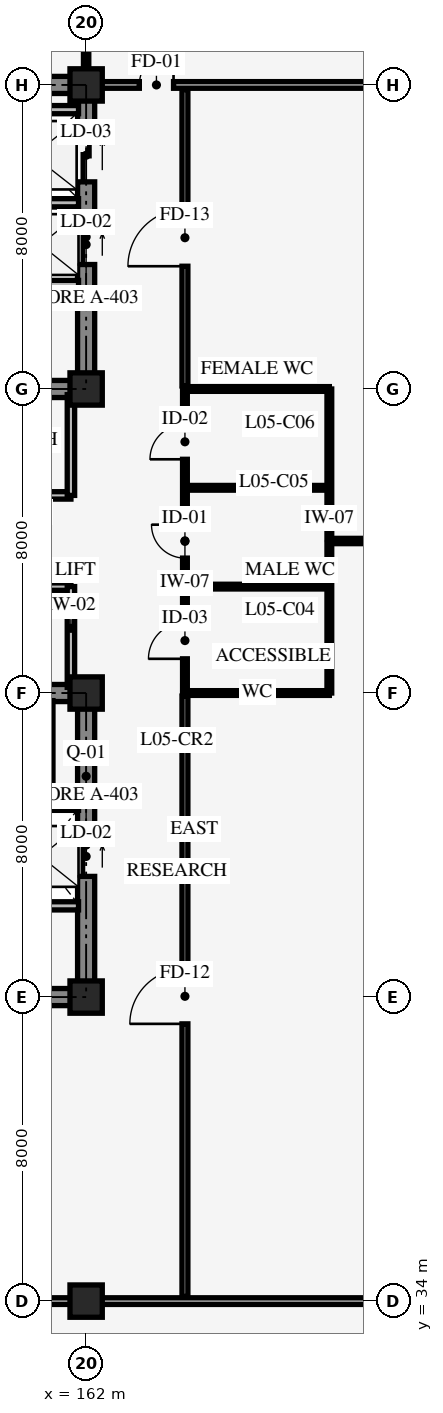
"""IFC4 building model, lengths in metres.
Left out: names, types, materials, properties, quantities, classifications, styles, units other than length and angle.
Written with IfcOpenShell. Run it as: python <this file> out.ifc"""

import sys

from ifc_helpers import new_model, si_unit, direction, frame, frame_2d, origin, origin_2d, place, context, subcontext, project, spatial, rectangle, extrude, element, fill, save


model = new_model("IFC4")
c1 = context("Model", 3, precision=1e-05, world=origin(), true_north=direction((0.0, 1.0)))
c2 = subcontext(c1, "Body", "Model", "MODEL_VIEW")
j1 = project(units=[si_unit("LENGTHUNIT", "METRE"), si_unit("PLANEANGLEUNIT", "RADIAN")], contexts=[c1])
p1 = place(None, origin())
s1 = spatial("IfcSite", under=j1, at=p1, CompositionType="ELEMENT")
p2 = place(p1, origin())
s2 = spatial("IfcBuilding", under=s1, at=p2, CompositionType="ELEMENT")
p3 = place(p2, frame((0.0, 0.0, 19.2)))
s3 = spatial("IfcBuildingStorey", under=s2, at=p3, CompositionType="ELEMENT", Elevation=19.2)
p4 = place(p3, frame((154.0, 42.0, 0.0), z_axis=(0.0, 0.0, 1.0), x_axis=(1.0, 0.0, 0.0)))
e1 = element("IfcWall", 1, at=p4, inside=s3, PredefinedType="SHEAR", context=c2, shape_type="SweptSolid", body=[
    extrude(rectangle(XDim=8.0, YDim=0.45, at=frame_2d((4.0, 0.0))), origin(), (0.0, 0.0, 1.0), 3.95),
])
p5 = place(p3, frame((162.0, 42.0, 0.0), z_axis=(0.0, 0.0, 1.0), x_axis=(0.0, 1.0, 0.0)))
e2 = element("IfcWall", 2, at=p5, inside=s3, PredefinedType="SHEAR", context=c2, shape_type="SweptSolid", body=[
    extrude(rectangle(XDim=8.0, YDim=0.45, at=frame_2d((4.0, 0.0))), origin(), (0.0, 0.0, 1.0), 3.95),
])
p6 = place(p5, frame((3.175, 0.0, 0.0)))
e3 = element("IfcOpeningElement", 3, at=p6, cuts=e2, PredefinedType="OPENING", context=c2, shape_type="SweptSolid", body=[
    extrude(rectangle(XDim=1.05, YDim=2.2, at=frame_2d((0.525, 1.1))), frame((0.0, 0.235, 0.0), z_axis=(0.0, -1.0, 0.0), x_axis=(1.0, 0.0, 0.0)), (0.0, 0.0, 1.0), 0.47),
])
p7 = place(p3, frame((162.0, 50.0, 0.0), z_axis=(0.0, 0.0, 1.0), x_axis=(-1.0, 0.0, 0.0)))
e4 = element("IfcWall", 4, at=p7, inside=s3, PredefinedType="SHEAR", context=c2, shape_type="SweptSolid", body=[
    extrude(rectangle(XDim=8.0, YDim=0.45, at=frame_2d((4.0, 0.0))), origin(), (0.0, 0.0, 1.0), 3.95),
])
p8 = place(p7, frame((5.3, 0.0, 0.0)))
e5 = element("IfcOpeningElement", 5, at=p8, cuts=e4, PredefinedType="OPENING", context=c2, shape_type="SweptSolid", body=[
    extrude(rectangle(XDim=1.3, YDim=2.15, at=frame_2d((0.65, 1.075))), frame((0.0, 0.235, 0.0), z_axis=(0.0, -1.0, 0.0), x_axis=(1.0, 0.0, 0.0)), (0.0, 0.0, 1.0), 0.47),
])
p9 = place(p7, frame((1.45, 0.0, 0.0)))
e6 = element("IfcOpeningElement", 6, at=p9, cuts=e4, PredefinedType="OPENING", context=c2, shape_type="SweptSolid", body=[
    extrude(rectangle(XDim=1.1, YDim=2.2, at=frame_2d((0.55, 1.1))), frame((0.0, 0.235, 0.0), z_axis=(0.0, -1.0, 0.0), x_axis=(1.0, 0.0, 0.0)), (0.0, 0.0, 1.0), 0.47),
])
p10 = place(p3, frame((154.0, 58.0, 0.0), z_axis=(0.0, 0.0, 1.0), x_axis=(1.0, 0.0, 0.0)))
e7 = element("IfcWall", 7, at=p10, inside=s3, PredefinedType="SHEAR", context=c2, shape_type="SweptSolid", body=[
    extrude(rectangle(XDim=8.0, YDim=0.45, at=frame_2d((4.0, 0.0))), origin(), (0.0, 0.0, 1.0), 3.95),
])
p11 = place(p10, frame((1.4, 0.0, 0.0)))
e8 = element("IfcOpeningElement", 8, at=p11, cuts=e7, PredefinedType="OPENING", context=c2, shape_type="SweptSolid", body=[
    extrude(rectangle(XDim=1.3, YDim=2.15, at=frame_2d((0.65, 1.075))), frame((0.0, 0.235, 0.0), z_axis=(0.0, -1.0, 0.0), x_axis=(1.0, 0.0, 0.0)), (0.0, 0.0, 1.0), 0.47),
])
p12 = place(p10, frame((5.3, 0.0, 0.0)))
e9 = element("IfcOpeningElement", 9, at=p12, cuts=e7, PredefinedType="OPENING", context=c2, shape_type="SweptSolid", body=[
    extrude(rectangle(XDim=1.1, YDim=2.2, at=frame_2d((0.55, 1.1))), frame((0.0, 0.235, 0.0), z_axis=(0.0, -1.0, 0.0), x_axis=(1.0, 0.0, 0.0)), (0.0, 0.0, 1.0), 0.47),
])
p13 = place(p3, frame((162.0, 58.0, 0.0), z_axis=(0.0, 0.0, 1.0), x_axis=(0.0, 1.0, 0.0)))
e10 = element("IfcWall", 10, at=p13, inside=s3, PredefinedType="SHEAR", context=c2, shape_type="SweptSolid", body=[
    extrude(rectangle(XDim=8.0, YDim=0.45, at=frame_2d((4.0, 0.0))), origin(), (0.0, 0.0, 1.0), 3.95),
])
p14 = place(p13, frame((3.275, 0.0, 0.0)))
e11 = element("IfcOpeningElement", 11, at=p14, cuts=e10, PredefinedType="OPENING", context=c2, shape_type="SweptSolid", body=[
    extrude(rectangle(XDim=1.05, YDim=2.2, at=frame_2d((0.525, 1.1))), frame((0.0, 0.235, 0.0), z_axis=(0.0, -1.0, 0.0), x_axis=(1.0, 0.0, 0.0)), (0.0, 0.0, 1.0), 0.47),
])
p15 = place(p13, frame((5.45, 0.0, 0.0)))
e12 = element("IfcOpeningElement", 12, at=p15, cuts=e10, PredefinedType="OPENING", context=c2, shape_type="SweptSolid", body=[
    extrude(rectangle(XDim=1.4, YDim=2.3, at=frame_2d((0.7, 1.15))), frame((0.0, 0.235, 0.0), z_axis=(0.0, -1.0, 0.0), x_axis=(1.0, 0.0, 0.0)), (0.0, 0.0, 1.0), 0.47),
])
p16 = place(p3, frame((162.0, 66.0, 0.0), z_axis=(0.0, 0.0, 1.0), x_axis=(-1.0, 0.0, 0.0)))
e13 = element("IfcWall", 13, at=p16, inside=s3, PredefinedType="SHEAR", context=c2, shape_type="SweptSolid", body=[
    extrude(rectangle(XDim=8.0, YDim=0.45, at=frame_2d((4.0, 0.0))), origin(), (0.0, 0.0, 1.0), 3.95),
])
for number, where, z_axis, x_axis in (
    (14, (162.0, 34.0, 0.0), (0.0, 0.0, 1.0), (1.0, 0.0, 0.0)),
    (15, (162.0, 42.0, 0.0), (0.0, 0.0, 1.0), (1.0, 0.0, 0.0)),
    (16, (162.0, 50.0, 0.0), (0.0, 0.0, 1.0), (1.0, 0.0, 0.0)),
    (17, (162.0, 58.0, 0.0), (0.0, 0.0, 1.0), (1.0, 0.0, 0.0)),
    (18, (162.0, 66.0, 0.0), (0.0, 0.0, 1.0), (1.0, 0.0, 0.0)),
):
    element("IfcColumn", number, at=place(p3, frame(where, z_axis=z_axis, x_axis=x_axis)), inside=s3, PredefinedType="COLUMN", context=c2, shape_type="SweptSolid", body=[
        extrude(rectangle(XDim=0.85, YDim=0.85, at=origin_2d()), origin(), (0.0, 0.0, 1.0), 4.2),
    ])
p17 = place(p3, frame((158.45, 47.02, 0.0), z_axis=(0.0, 0.0, 1.0), x_axis=(1.0, 0.0, 0.0)))
e19 = element("IfcWall", 19, at=p17, inside=s3, PredefinedType="STANDARD", context=c2, shape_type="SweptSolid", body=[
    extrude(rectangle(XDim=3.35, YDim=0.215, at=frame_2d((1.675, 0.0))), origin(), (0.0, 0.0, 1.0), 3.9),
])
p18 = place(p3, frame((161.02, 47.02, 0.0), z_axis=(0.0, 0.0, 1.0), x_axis=(0.0, 1.0, 0.0)))
e20 = element("IfcWall", 20, at=p18, inside=s3, PredefinedType="STANDARD", context=c2, shape_type="SweptSolid", body=[
    extrude(rectangle(XDim=2.78, YDim=0.215, at=frame_2d((1.39, 0.0))), origin(), (0.0, 0.0, 1.0), 3.9),
])
p19 = place(p3, frame((159.78, 44.4, 0.0), z_axis=(0.0, 0.0, 1.0), x_axis=(1.0, 0.0, 0.0)))
e21 = element("IfcWall", 21, at=p19, inside=s3, PredefinedType="STANDARD", context=c2, shape_type="SweptSolid", body=[
    extrude(rectangle(XDim=2.02, YDim=0.215, at=frame_2d((1.01, 0.0))), origin(), (0.0, 0.0, 1.0), 3.9),
])
p20 = place(p3, frame((158.45, 62.9, 0.0), z_axis=(0.0, 0.0, 1.0), x_axis=(1.0, 0.0, 0.0)))
e22 = element("IfcWall", 22, at=p20, inside=s3, PredefinedType="STANDARD", context=c2, shape_type="SweptSolid", body=[
    extrude(rectangle(XDim=3.35, YDim=0.215, at=frame_2d((1.675, 0.0))), origin(), (0.0, 0.0, 1.0), 3.9),
])
p21 = place(p3, frame((159.38, 65.35, 0.0), z_axis=(0.0, 0.0, 1.0), x_axis=(1.0, 0.0, 0.0)))
e23 = element("IfcWall", 23, at=p21, inside=s3, PredefinedType="STANDARD", context=c2, shape_type="SweptSolid", body=[
    extrude(rectangle(XDim=2.42, YDim=0.215, at=frame_2d((1.21, 0.0))), origin(), (0.0, 0.0, 1.0), 3.9),
])
p22 = place(p3, frame((158.45, 60.75, 0.0), z_axis=(0.0, 0.0, 1.0), x_axis=(1.0, 0.0, 0.0)))
e24 = element("IfcWall", 24, at=p22, inside=s3, PredefinedType="STANDARD", context=c2, shape_type="SweptSolid", body=[
    extrude(rectangle(XDim=3.35, YDim=0.215, at=frame_2d((1.675, 0.0))), origin(), (0.0, 0.0, 1.0), 3.9),
])
p23 = place(p3, frame((154.0, 52.8, 0.0), z_axis=(0.0, 0.0, 1.0), x_axis=(1.0, 0.0, 0.0)))
e25 = element("IfcWall", 25, at=p23, inside=s3, PredefinedType="STANDARD", context=c2, shape_type="SweptSolid", body=[
    extrude(rectangle(XDim=7.6, YDim=0.195, at=frame_2d((3.8, 0.0))), origin(), (0.0, 0.0, 1.0), 3.9),
])
p24 = place(p23, frame((2.8, 0.0, 0.0)))
e26 = element("IfcOpeningElement", 26, at=p24, cuts=e25, PredefinedType="OPENING", context=c2, shape_type="SweptSolid", body=[
    extrude(rectangle(XDim=1.45, YDim=2.2, at=frame_2d((0.725, 1.1))), frame((0.0, 0.107, 0.0), z_axis=(0.0, -1.0, 0.0), x_axis=(1.0, 0.0, 0.0)), (0.0, 0.0, 1.0), 0.215),
])
p25 = place(p3, frame((161.6, 50.15, 0.0), z_axis=(0.0, 0.0, 1.0), x_axis=(0.0, 1.0, 0.0)))
e27 = element("IfcWall", 27, at=p25, inside=s3, PredefinedType="STANDARD", context=c2, shape_type="SweptSolid", body=[
    extrude(rectangle(XDim=2.65, YDim=0.195, at=frame_2d((1.325, 0.0))), origin(), (0.0, 0.0, 1.0), 3.19),
])
p26 = place(p3, frame((154.0, 55.2, 0.0), z_axis=(0.0, 0.0, 1.0), x_axis=(1.0, 0.0, 0.0)))
e28 = element("IfcWall", 28, at=p26, inside=s3, PredefinedType="STANDARD", context=c2, shape_type="SweptSolid", body=[
    extrude(rectangle(XDim=7.6, YDim=0.195, at=frame_2d((3.8, 0.0))), origin(), (0.0, 0.0, 1.0), 3.9),
])
p27 = place(p26, frame((2.8, 0.0, 0.0)))
e29 = element("IfcOpeningElement", 29, at=p27, cuts=e28, PredefinedType="OPENING", context=c2, shape_type="SweptSolid", body=[
    extrude(rectangle(XDim=1.25, YDim=2.15, at=frame_2d((0.625, 1.075))), frame((0.0, 0.107, 0.0), z_axis=(0.0, -1.0, 0.0), x_axis=(1.0, 0.0, 0.0)), (0.0, 0.0, 1.0), 0.215),
])
p28 = place(p3, frame((161.6, 55.2, 0.0), z_axis=(0.0, 0.0, 1.0), x_axis=(0.0, 1.0, 0.0)))
e30 = element("IfcWall", 30, at=p28, inside=s3, PredefinedType="STANDARD", context=c2, shape_type="SweptSolid", body=[
    extrude(rectangle(XDim=2.65, YDim=0.195, at=frame_2d((1.325, 0.0))), origin(), (0.0, 0.0, 1.0), 3.19),
])
p29 = place(p3, frame((164.6, 50.0, 0.0), z_axis=(0.0, 0.0, 1.0), x_axis=(0.0, 1.0, 0.0)))
e31 = element("IfcWall", 31, at=p29, inside=s3, PredefinedType="STANDARD", context=c2, shape_type="SweptSolid", body=[
    extrude(rectangle(XDim=8.0, YDim=0.125, at=frame_2d((4.0, 0.0))), origin(), (0.0, 0.0, 1.0), 3.9),
])
p30 = place(p29, frame((0.9, 0.0, 0.0)))
e32 = element("IfcOpeningElement", 32, at=p30, cuts=e31, PredefinedType="OPENING", context=c2, shape_type="SweptSolid", body=[
    extrude(rectangle(XDim=0.96, YDim=2.08, at=frame_2d((0.48, 1.04))), frame((0.0, 0.073, 0.0), z_axis=(0.0, -1.0, 0.0), x_axis=(1.0, 0.0, 0.0)), (0.0, 0.0, 1.0), 0.145),
])
p31 = place(p29, frame((3.55, 0.0, 0.0)))
e33 = element("IfcOpeningElement", 33, at=p31, cuts=e31, PredefinedType="OPENING", context=c2, shape_type="SweptSolid", body=[
    extrude(rectangle(XDim=0.88, YDim=2.05, at=frame_2d((0.44, 1.025))), frame((0.0, 0.073, 0.0), z_axis=(0.0, -1.0, 0.0), x_axis=(1.0, 0.0, 0.0)), (0.0, 0.0, 1.0), 0.145),
])
p32 = place(p29, frame((6.15, 0.0, 0.0)))
e34 = element("IfcOpeningElement", 34, at=p32, cuts=e31, PredefinedType="OPENING", context=c2, shape_type="SweptSolid", body=[
    extrude(rectangle(XDim=0.92, YDim=2.05, at=frame_2d((0.46, 1.025))), frame((0.0, 0.073, 0.0), z_axis=(0.0, -1.0, 0.0), x_axis=(1.0, 0.0, 0.0)), (0.0, 0.0, 1.0), 0.145),
])
p33 = place(p3, frame((168.4, 50.0, 0.0), z_axis=(0.0, 0.0, 1.0), x_axis=(0.0, 1.0, 0.0)))
e35 = element("IfcWall", 35, at=p33, inside=s3, PredefinedType="STANDARD", context=c2, shape_type="SweptSolid", body=[
    extrude(rectangle(XDim=8.0, YDim=0.125, at=frame_2d((4.0, 0.0))), origin(), (0.0, 0.0, 1.0), 3.9),
])
p34 = place(p3, frame((164.6, 50.0, 0.0), z_axis=(0.0, 0.0, 1.0), x_axis=(1.0, 0.0, 0.0)))
e36 = element("IfcWall", 36, at=p34, inside=s3, PredefinedType="STANDARD", context=c2, shape_type="SweptSolid", body=[
    extrude(rectangle(XDim=3.8, YDim=0.125, at=frame_2d((1.9, 0.0))), origin(), (0.0, 0.0, 1.0), 3.14),
])
for number, where, z_axis, x_axis in (
    (37, (164.6, 52.8, 0.0), (0.0, 0.0, 1.0), (1.0, 0.0, 0.0)),
    (38, (164.6, 55.4, 0.0), (0.0, 0.0, 1.0), (1.0, 0.0, 0.0)),
):
    element("IfcWall", number, at=place(p3, frame(where, z_axis=z_axis, x_axis=x_axis)), inside=s3, PredefinedType="STANDARD", context=c2, shape_type="SweptSolid", body=[
        extrude(rectangle(XDim=3.8, YDim=0.125, at=frame_2d((1.9, 0.0))), origin(), (0.0, 0.0, 1.0), 3.9),
    ])
p35 = place(p3, frame((164.6, 58.0, 0.0), z_axis=(0.0, 0.0, 1.0), x_axis=(1.0, 0.0, 0.0)))
e39 = element("IfcWall", 39, at=p35, inside=s3, PredefinedType="STANDARD", context=c2, shape_type="SweptSolid", body=[
    extrude(rectangle(XDim=3.8, YDim=0.125, at=frame_2d((1.9, 0.0))), origin(), (0.0, 0.0, 1.0), 3.14),
])
p36 = place(p3, frame((164.6, 34.12, 0.0), z_axis=(0.0, 0.0, 1.0), x_axis=(0.0, 1.0, 0.0)))
e40 = element("IfcWall", 40, at=p36, inside=s3, PredefinedType="STANDARD", context=c2, shape_type="SweptSolid", body=[
    extrude(rectangle(XDim=15.8, YDim=0.155, at=frame_2d((7.9, 0.0))), origin(), (0.0, 0.0, 1.0), 3.9),
])
p37 = place(p36, frame((7.175, 0.0, 0.0)))
e41 = element("IfcOpeningElement", 41, at=p37, cuts=e40, PredefinedType="OPENING", context=c2, shape_type="SweptSolid", body=[
    extrude(rectangle(XDim=1.45, YDim=2.2, at=frame_2d((0.725, 1.1))), frame((0.0, 0.087, 0.0), z_axis=(0.0, -1.0, 0.0), x_axis=(1.0, 0.0, 0.0)), (0.0, 0.0, 1.0), 0.175),
])
p38 = place(p3, frame((168.4, 54.0, 0.0), z_axis=(0.0, 0.0, 1.0), x_axis=(1.0, 0.0, 0.0)))
e42 = element("IfcWall", 42, at=p38, inside=s3, PredefinedType="STANDARD", context=c2, shape_type="SweptSolid", body=[
    extrude(rectangle(XDim=8.96, YDim=0.14, at=frame_2d((4.48, 0.0))), origin(), (0.0, 0.0, 1.0), 3.9),
])
p39 = place(p38, frame((3.84, 0.0, 0.0)))
e43 = element("IfcOpeningElement", 43, at=p39, cuts=e42, PredefinedType="OPENING", context=c2, shape_type="SweptSolid", body=[
    extrude(rectangle(XDim=1.28, YDim=2.14, at=frame_2d((0.64, 1.07))), frame((0.0, 0.08, 0.0), z_axis=(0.0, -1.0, 0.0), x_axis=(1.0, 0.0, 0.0)), (0.0, 0.0, 1.0), 0.16),
])
p40 = place(p3, frame((164.6, 58.08, 0.0), z_axis=(0.0, 0.0, 1.0), x_axis=(0.0, 1.0, 0.0)))
e44 = element("IfcWall", 44, at=p40, inside=s3, PredefinedType="STANDARD", context=c2, shape_type="SweptSolid", body=[
    extrude(rectangle(XDim=7.8, YDim=0.155, at=frame_2d((3.9, 0.0))), origin(), (0.0, 0.0, 1.0), 3.9),
])
p41 = place(p40, frame((3.15, 0.0, 0.0)))
e45 = element("IfcOpeningElement", 45, at=p41, cuts=e44, PredefinedType="OPENING", context=c2, shape_type="SweptSolid", body=[
    extrude(rectangle(XDim=1.5, YDim=2.2, at=frame_2d((0.75, 1.1))), frame((0.0, 0.087, 0.0), z_axis=(0.0, -1.0, 0.0), x_axis=(1.0, 0.0, 0.0)), (0.0, 0.0, 1.0), 0.175),
])
p42 = place(p3, frame((158.35, 34.0, 0.0), z_axis=(0.0, 0.0, 1.0), x_axis=(1.0, 0.0, 0.0)))
e46 = element("IfcWall", 46, at=p42, inside=s3, PredefinedType="STANDARD", context=c2, shape_type="SweptSolid", body=[
    extrude(rectangle(XDim=18.7, YDim=0.175, at=frame_2d((9.35, 0.0))), origin(), (0.0, 0.0, 1.0), 3.14),
])
p43 = place(p42, frame((0.35, 0.0, 0.0)))
e47 = element("IfcOpeningElement", 47, at=p43, cuts=e46, PredefinedType="OPENING", context=c2, shape_type="SweptSolid", body=[
    extrude(rectangle(XDim=1.45, YDim=2.2, at=frame_2d((0.725, 1.1))), frame((0.0, 0.098, 0.0), z_axis=(0.0, -1.0, 0.0), x_axis=(1.0, 0.0, 0.0)), (0.0, 0.0, 1.0), 0.195),
])
p44 = place(p3, frame((162.0, 66.12, 0.0), z_axis=(0.0, 0.0, 1.0), x_axis=(0.0, 1.0, 0.0)))
e48 = element("IfcWall", 48, at=p44, inside=s3, PredefinedType="STANDARD", context=c2, shape_type="SweptSolid", body=[
    extrude(rectangle(XDim=7.83, YDim=0.14, at=frame_2d((3.915, 0.0))), origin(), (0.0, 0.0, 1.0), 3.19),
])
p45 = place(p44, frame((3.0, 0.0, 0.0)))
e49 = element("IfcOpeningElement", 49, at=p45, cuts=e48, PredefinedType="OPENING", context=c2, shape_type="SweptSolid", body=[
    extrude(rectangle(XDim=1.12, YDim=2.12, at=frame_2d((0.56, 1.06))), frame((0.0, 0.08, 0.0), z_axis=(0.0, -1.0, 0.0), x_axis=(1.0, 0.0, 0.0)), (0.0, 0.0, 1.0), 0.16),
])
p46 = place(p3, frame((162.35, 66.0, 0.0), z_axis=(0.0, 0.0, 1.0), x_axis=(1.0, 0.0, 0.0)))
e50 = element("IfcWall", 50, at=p46, inside=s3, PredefinedType="STANDARD", context=c2, shape_type="SweptSolid", body=[
    extrude(rectangle(XDim=14.7, YDim=0.175, at=frame_2d((7.35, 0.0))), origin(), (0.0, 0.0, 1.0), 3.14),
])
p47 = place(p46, frame((1.05, 0.0, 0.0)))
e51 = element("IfcOpeningElement", 51, at=p47, cuts=e50, PredefinedType="OPENING", context=c2, shape_type="SweptSolid", body=[
    extrude(rectangle(XDim=0.9, YDim=2.1, at=frame_2d((0.45, 1.05))), frame((0.0, 0.098, 0.0), z_axis=(0.0, -1.0, 0.0), x_axis=(1.0, 0.0, 0.0)), (0.0, 0.0, 1.0), 0.195),
])
p48 = place(p6, origin())
e52 = element("IfcDoor", 52, at=p48, inside=s3, OperationType="SLIDING_TO_LEFT", PredefinedType="DOOR", context=c2, shape_type="SweptSolid", body=[
    extrude(rectangle(XDim=1.05, YDim=2.2, at=frame_2d((0.525, 1.1))), frame((0.0, 0.025, 0.0), z_axis=(0.0, -1.0, 0.0), x_axis=(1.0, 0.0, 0.0)), (0.0, 0.0, 1.0), 0.05),
])
fill(e3, e52)
p49 = place(p14, origin())
e53 = element("IfcDoor", 53, at=p49, inside=s3, OperationType="SLIDING_TO_RIGHT", PredefinedType="DOOR", context=c2, shape_type="SweptSolid", body=[
    extrude(rectangle(XDim=1.05, YDim=2.2, at=frame_2d((0.525, 1.1))), frame((0.0, 0.025, 0.0), z_axis=(0.0, -1.0, 0.0), x_axis=(1.0, 0.0, 0.0)), (0.0, 0.0, 1.0), 0.05),
])
fill(e11, e53)
p50 = place(p15, origin())
e54 = element("IfcDoor", 54, at=p50, inside=s3, OperationType="DOUBLE_DOOR_SLIDING", PredefinedType="DOOR", context=c2, shape_type="SweptSolid", body=[
    extrude(rectangle(XDim=1.4, YDim=2.3, at=frame_2d((0.7, 1.15))), frame((0.0, 0.025, 0.0), z_axis=(0.0, -1.0, 0.0), x_axis=(1.0, 0.0, 0.0)), (0.0, 0.0, 1.0), 0.05),
])
fill(e12, e54)
p51 = place(p30, origin())
e55 = element("IfcDoor", 55, at=p51, inside=s3, OperationType="SINGLE_SWING_LEFT", PredefinedType="DOOR", context=c2, shape_type="SweptSolid", body=[
    extrude(rectangle(XDim=0.96, YDim=2.08, at=frame_2d((0.48, 1.04))), frame((0.0, 0.025, 0.0), z_axis=(0.0, -1.0, 0.0), x_axis=(1.0, 0.0, 0.0)), (0.0, 0.0, 1.0), 0.05),
])
fill(e32, e55)
p52 = place(p31, origin())
e56 = element("IfcDoor", 56, at=p52, inside=s3, OperationType="SINGLE_SWING_RIGHT", PredefinedType="DOOR", context=c2, shape_type="SweptSolid", body=[
    extrude(rectangle(XDim=0.88, YDim=2.05, at=frame_2d((0.44, 1.025))), frame((0.0, 0.025, 0.0), z_axis=(0.0, -1.0, 0.0), x_axis=(1.0, 0.0, 0.0)), (0.0, 0.0, 1.0), 0.05),
])
fill(e33, e56)
p53 = place(p32, origin())
e57 = element("IfcDoor", 57, at=p53, inside=s3, OperationType="SINGLE_SWING_LEFT", PredefinedType="DOOR", context=c2, shape_type="SweptSolid", body=[
    extrude(rectangle(XDim=0.92, YDim=2.05, at=frame_2d((0.46, 1.025))), frame((0.0, 0.025, 0.0), z_axis=(0.0, -1.0, 0.0), x_axis=(1.0, 0.0, 0.0)), (0.0, 0.0, 1.0), 0.05),
])
fill(e34, e57)
p54 = place(p37, origin())
e58 = element("IfcDoor", 58, at=p54, inside=s3, OperationType="SINGLE_SWING_LEFT", PredefinedType="DOOR", context=c2, shape_type="SweptSolid", body=[
    extrude(rectangle(XDim=1.45, YDim=2.2, at=frame_2d((0.725, 1.1))), frame((0.0, 0.025, 0.0), z_axis=(0.0, -1.0, 0.0), x_axis=(1.0, 0.0, 0.0)), (0.0, 0.0, 1.0), 0.05),
])
fill(e41, e58)
p55 = place(p41, origin())
e59 = element("IfcDoor", 59, at=p55, inside=s3, OperationType="SINGLE_SWING_LEFT", PredefinedType="DOOR", context=c2, shape_type="SweptSolid", body=[
    extrude(rectangle(XDim=1.5, YDim=2.2, at=frame_2d((0.75, 1.1))), frame((0.0, 0.025, 0.0), z_axis=(0.0, -1.0, 0.0), x_axis=(1.0, 0.0, 0.0)), (0.0, 0.0, 1.0), 0.05),
])
fill(e45, e59)
p56 = place(p47, origin())
e60 = element("IfcDoor", 60, at=p56, inside=s3, OperationType="SINGLE_SWING_RIGHT", PredefinedType="DOOR", context=c2, shape_type="SweptSolid", body=[
    extrude(rectangle(XDim=0.9, YDim=2.1, at=frame_2d((0.45, 1.05))), frame((0.0, 0.025, 0.0), z_axis=(0.0, -1.0, 0.0), x_axis=(1.0, 0.0, 0.0)), (0.0, 0.0, 1.0), 0.05),
])
fill(e51, e60)
save(model, sys.argv[1])
